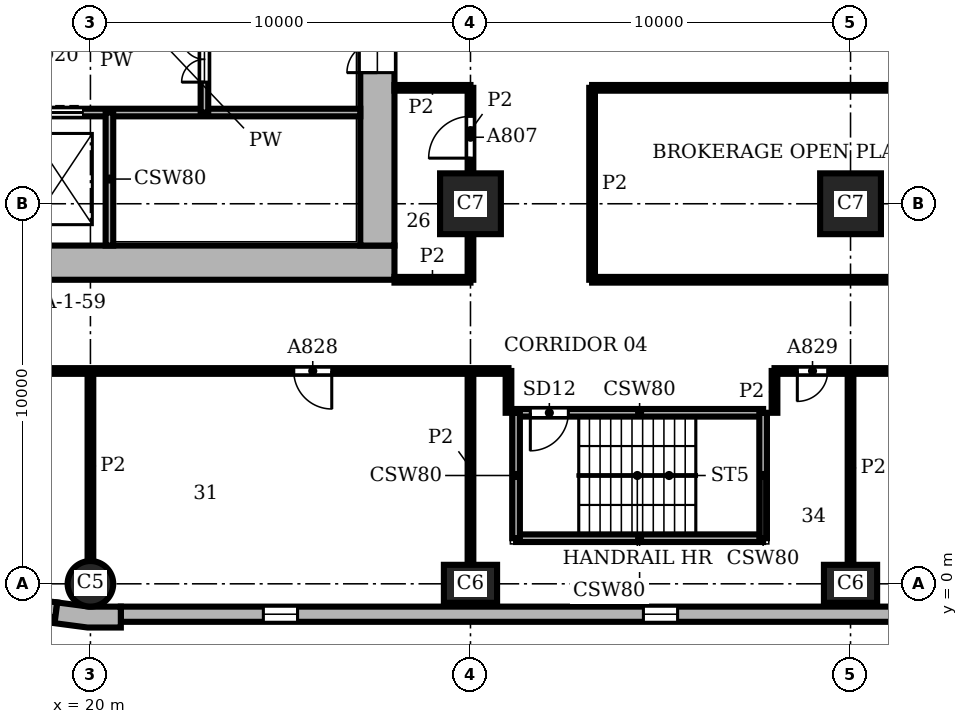
"""IFC4 building model, lengths in metres.
Left out: names, types, materials, properties, quantities, classifications, styles, units other than length and angle.
Written with IfcOpenShell. Run it as: python <this file> out.ifc"""

import sys

from ifc_helpers import new_model, si_unit, direction, frame, frame_2d, origin, origin_2d, place, context, subcontext, project, spatial, polyline, rectangle, circle, outline, extrude, element, fill, save


model = new_model("IFC4")
c1 = context("Model", 3, precision=1e-05, world=origin(), true_north=direction((0.0, 1.0)))
c2 = subcontext(c1, "Body", "Model", "MODEL_VIEW")
j1 = project(units=[si_unit("LENGTHUNIT", "METRE"), si_unit("PLANEANGLEUNIT", "RADIAN")], contexts=[c1])
p1 = place(None, origin())
s1 = spatial("IfcSite", under=j1, at=p1, CompositionType="ELEMENT")
p2 = place(p1, origin())
s2 = spatial("IfcBuilding", under=s1, at=p2, CompositionType="ELEMENT")
p3 = place(p2, frame((0.0, 0.0, 93.9)))
s3 = spatial("IfcBuildingStorey", under=s2, at=p3, CompositionType="ELEMENT", Elevation=93.9)
p4 = place(p3, frame((20.0, 0.0, 0.0), z_axis=(0.0, 0.0, 1.0), x_axis=(1.0, 0.0, 0.0)))
e1 = element("IfcColumn", 1, at=p4, inside=s3, PredefinedType="COLUMN", context=c2, shape_type="SweptSolid", body=[
    extrude(circle(Radius=0.6, at=origin_2d()), origin(), (0.0, 0.0, 1.0), 3.9),
])
for number, where, z_axis, x_axis in (
    (2, (30.0, 0.0, 0.0), (0.0, 0.0, 1.0), (1.0, 0.0, 0.0)),
    (3, (40.0, 0.0, 0.0), (0.0, 0.0, 1.0), (1.0, 0.0, 0.0)),
):
    element("IfcColumn", number, at=place(p3, frame(where, z_axis=z_axis, x_axis=x_axis)), inside=s3, PredefinedType="COLUMN", context=c2, shape_type="SweptSolid", body=[
        extrude(rectangle(XDim=1.4, YDim=1.0, at=origin_2d()), origin(), (0.0, 0.0, 1.0), 3.9),
    ])
for number, where, z_axis, x_axis in (
    (4, (30.0, 10.0, 0.0), (0.0, 0.0, 1.0), (1.0, 0.0, 0.0)),
    (5, (40.0, 10.0, 0.0), (0.0, 0.0, 1.0), (1.0, 0.0, 0.0)),
):
    element("IfcColumn", number, at=place(p3, frame(where, z_axis=z_axis, x_axis=x_axis)), inside=s3, PredefinedType="COLUMN", context=c2, shape_type="SweptSolid", body=[
        extrude(rectangle(XDim=1.6, YDim=1.6, at=origin_2d()), origin(), (0.0, 0.0, 1.0), 3.9),
    ])
p5 = place(p3, frame((8.0, 8.45, 0.0), z_axis=(0.0, 0.0, 1.0), x_axis=(1.0, 0.0, 0.0)))
e6 = element("IfcWall", 6, at=p5, inside=s3, PredefinedType="SHEAR", context=c2, shape_type="SweptSolid", body=[
    extrude(rectangle(XDim=20.0, YDim=0.9, at=frame_2d((10.0, 0.0))), origin(), (0.0, 0.0, 1.0), 3.9),
])
p6 = place(p3, frame((27.55, 8.9, 0.0), z_axis=(0.0, 0.0, 1.0), x_axis=(0.0, 1.0, 0.0)))
e7 = element("IfcWall", 7, at=p6, inside=s3, PredefinedType="SHEAR", context=c2, shape_type="SweptSolid", body=[
    extrude(rectangle(XDim=18.2, YDim=0.9, at=frame_2d((9.1, 0.0))), origin(), (0.0, 0.0, 1.0), 3.9),
])
p7 = place(p6, frame((4.55, 0.0, 0.0)))
e8 = element("IfcOpeningElement", 8, at=p7, cuts=e7, PredefinedType="OPENING", context=c2, shape_type="SweptSolid", body=[
    extrude(rectangle(XDim=1.6, YDim=2.1, at=frame_2d((0.8, 1.05))), frame((0.0, 0.46, 0.0), z_axis=(0.0, -1.0, 0.0), x_axis=(1.0, 0.0, 0.0)), (0.0, 0.0, 1.0), 0.92),
])
p8 = place(p3, origin())
e9 = element("IfcWall", 9, at=p8, inside=s3, PredefinedType="SOLIDWALL", context=c2, shape_type="SweptSolid", body=[
    extrude(outline(polyline([(19.076, -0.887), (19.057, -1.036), (19.925, -1.15), (20.8, -1.15), (20.8, -1.0), (20.8, -0.6), (19.961, -0.6), (19.128, -0.49), (19.076, -0.887)])), origin(), (0.0, 0.0, 1.0), 3.9),
])
p9 = place(p3, frame((20.8, -0.8, 0.0), z_axis=(0.0, 0.0, 1.0), x_axis=(1.0, 0.0, 0.0)))
e10 = element("IfcWall", 10, at=p9, inside=s3, PredefinedType="SOLIDWALL", context=c2, shape_type="SweptSolid", body=[
    extrude(rectangle(XDim=48.4, YDim=0.4, at=frame_2d((24.2, 0.0))), origin(), (0.0, 0.0, 1.0), 3.9),
])
p10 = place(p9, frame((3.75, 0.0, 0.9)))
e11 = element("IfcOpeningElement", 11, at=p10, cuts=e10, PredefinedType="OPENING", context=c2, shape_type="SweptSolid", body=[
    extrude(rectangle(XDim=0.9, YDim=2.35, at=frame_2d((0.45, 1.175))), frame((0.0, 0.21, 0.0), z_axis=(0.0, -1.0, 0.0), x_axis=(1.0, 0.0, 0.0)), (0.0, 0.0, 1.0), 0.42),
])
p11 = place(p9, frame((13.75, 0.0, 0.9)))
e12 = element("IfcOpeningElement", 12, at=p11, cuts=e10, PredefinedType="OPENING", context=c2, shape_type="SweptSolid", body=[
    extrude(rectangle(XDim=0.9, YDim=2.35, at=frame_2d((0.45, 1.175))), frame((0.0, 0.21, 0.0), z_axis=(0.0, -1.0, 0.0), x_axis=(1.0, 0.0, 0.0)), (0.0, 0.0, 1.0), 0.42),
])
p12 = place(p9, frame((23.75, 0.0, 0.9)))
e13 = element("IfcOpeningElement", 13, at=p12, cuts=e10, PredefinedType="OPENING", context=c2, shape_type="SweptSolid", body=[
    extrude(rectangle(XDim=0.9, YDim=2.35, at=frame_2d((0.45, 1.175))), frame((0.0, 0.21, 0.0), z_axis=(0.0, -1.0, 0.0), x_axis=(1.0, 0.0, 0.0)), (0.0, 0.0, 1.0), 0.42),
])
p13 = place(p9, frame((33.75, 0.0, 0.9)))
e14 = element("IfcOpeningElement", 14, at=p13, cuts=e10, PredefinedType="OPENING", context=c2, shape_type="SweptSolid", body=[
    extrude(rectangle(XDim=0.9, YDim=2.35, at=frame_2d((0.45, 1.175))), frame((0.0, 0.21, 0.0), z_axis=(0.0, -1.0, 0.0), x_axis=(1.0, 0.0, 0.0)), (0.0, 0.0, 1.0), 0.42),
])
p14 = place(p9, frame((43.75, 0.0, 0.9)))
e15 = element("IfcOpeningElement", 15, at=p14, cuts=e10, PredefinedType="OPENING", context=c2, shape_type="SweptSolid", body=[
    extrude(rectangle(XDim=0.9, YDim=2.35, at=frame_2d((0.45, 1.175))), frame((0.0, 0.21, 0.0), z_axis=(0.0, -1.0, 0.0), x_axis=(1.0, 0.0, 0.0)), (0.0, 0.0, 1.0), 0.42),
])
p15 = place(p3, frame((15.017, -0.151, 0.0), z_axis=(0.0, 0.0, 1.0), x_axis=(0.991446429508, -0.130514280502, 0.0)))
e16 = element("IfcWall", 16, at=p15, inside=s3, PredefinedType="SOLIDWALL", context=c2, shape_type="SweptSolid", body=[
    extrude(rectangle(XDim=4.121, YDim=0.4, at=frame_2d((2.061, 0.0))), origin(), (0.0, 0.0, 1.0), 3.9),
])
p16 = place(p15, frame((1.611, 0.0, 0.9)))
e17 = element("IfcOpeningElement", 17, at=p16, cuts=e16, PredefinedType="OPENING", context=c2, shape_type="SweptSolid", body=[
    extrude(rectangle(XDim=0.9, YDim=2.35, at=frame_2d((0.45, 1.175))), frame((0.0, 0.21, 0.0), z_axis=(0.0, -1.0, 0.0), x_axis=(1.0, 0.0, 0.0)), (0.0, 0.0, 1.0), 0.42),
])
p17 = place(p3, frame((31.2, 1.2, 0.0), z_axis=(0.0, 0.0, 1.0), x_axis=(1.0, 0.0, 0.0)))
e18 = element("IfcWall", 18, at=p17, inside=s3, PredefinedType="SHEAR", context=c2, shape_type="SweptSolid", body=[
    extrude(rectangle(XDim=6.5, YDim=0.2, at=frame_2d((3.25, 0.0))), origin(), (0.0, 0.0, 1.0), 3.58),
])
p18 = place(p3, frame((31.2, 4.5, 0.0), z_axis=(0.0, 0.0, 1.0), x_axis=(1.0, 0.0, 0.0)))
e19 = element("IfcWall", 19, at=p18, inside=s3, PredefinedType="SHEAR", context=c2, shape_type="SweptSolid", body=[
    extrude(rectangle(XDim=6.5, YDim=0.2, at=frame_2d((3.25, 0.0))), origin(), (0.0, 0.0, 1.0), 3.58),
])
p19 = place(p18, frame((0.375, 0.0, 0.0)))
e20 = element("IfcOpeningElement", 20, at=p19, cuts=e19, PredefinedType="OPENING", context=c2, shape_type="SweptSolid", body=[
    extrude(rectangle(XDim=1.0, YDim=2.1, at=frame_2d((0.5, 1.05))), frame((0.0, 0.11, 0.0), z_axis=(0.0, -1.0, 0.0), x_axis=(1.0, 0.0, 0.0)), (0.0, 0.0, 1.0), 0.22),
])
p20 = place(p3, frame((13.8, 12.4, 0.0), z_axis=(0.0, 0.0, 1.0), x_axis=(1.0, 0.0, 0.0)))
e21 = element("IfcWall", 21, at=p20, inside=s3, PredefinedType="SHEAR", context=c2, shape_type="SweptSolid", body=[
    extrude(rectangle(XDim=13.3, YDim=0.2, at=frame_2d((6.65, 0.0))), origin(), (0.0, 0.0, 1.0), 3.58),
])
p21 = place(p20, frame((2.4, 0.0, 0.0)))
e22 = element("IfcOpeningElement", 22, at=p21, cuts=e21, PredefinedType="OPENING", context=c2, shape_type="SweptSolid", body=[
    extrude(rectangle(XDim=1.1, YDim=2.1, at=frame_2d((0.55, 1.05))), frame((0.0, 0.11, 0.0), z_axis=(0.0, -1.0, 0.0), x_axis=(1.0, 0.0, 0.0)), (0.0, 0.0, 1.0), 0.22),
])
p22 = place(p20, frame((4.9, 0.0, 0.0)))
e23 = element("IfcOpeningElement", 23, at=p22, cuts=e21, PredefinedType="OPENING", context=c2, shape_type="SweptSolid", body=[
    extrude(rectangle(XDim=1.1, YDim=2.1, at=frame_2d((0.55, 1.05))), frame((0.0, 0.11, 0.0), z_axis=(0.0, -1.0, 0.0), x_axis=(1.0, 0.0, 0.0)), (0.0, 0.0, 1.0), 0.22),
])
p23 = place(p20, frame((0.25, 0.0, 0.0)))
e24 = element("IfcOpeningElement", 24, at=p23, cuts=e21, PredefinedType="OPENING", context=c2, shape_type="SweptSolid", body=[
    extrude(rectangle(XDim=1.0, YDim=2.1, at=frame_2d((0.5, 1.05))), frame((0.0, 0.11, 0.0), z_axis=(0.0, -1.0, 0.0), x_axis=(1.0, 0.0, 0.0)), (0.0, 0.0, 1.0), 0.22),
])
p24 = place(p3, frame((20.5, 8.9, 0.0), z_axis=(0.0, 0.0, 1.0), x_axis=(0.0, 1.0, 0.0)))
e25 = element("IfcWall", 25, at=p24, inside=s3, PredefinedType="SHEAR", context=c2, shape_type="SweptSolid", body=[
    extrude(rectangle(XDim=3.5, YDim=0.2, at=frame_2d((1.75, 0.0))), origin(), (0.0, 0.0, 1.0), 3.58),
])
p25 = place(p3, frame((23.0, 12.4, 0.0), z_axis=(0.0, 0.0, 1.0), x_axis=(0.0, 1.0, 0.0)))
e26 = element("IfcWall", 26, at=p25, inside=s3, PredefinedType="SHEAR", context=c2, shape_type="SweptSolid", body=[
    extrude(rectangle(XDim=2.8, YDim=0.2, at=frame_2d((1.4, 0.0))), origin(), (0.0, 0.0, 1.0), 3.58),
])
p26 = place(p25, frame((0.8, 0.0, 0.0)))
e27 = element("IfcOpeningElement", 27, at=p26, cuts=e26, PredefinedType="OPENING", context=c2, shape_type="SweptSolid", body=[
    extrude(rectangle(XDim=1.2, YDim=2.1, at=frame_2d((0.6, 1.05))), frame((0.0, 0.11, 0.0), z_axis=(0.0, -1.0, 0.0), x_axis=(1.0, 0.0, 0.0)), (0.0, 0.0, 1.0), 0.22),
])
for number, where, z_axis, x_axis in (
    (28, (31.2, 1.2, 0.0), (0.0, 0.0, 1.0), (0.0, 1.0, 0.0)),
    (29, (37.7, 1.2, 0.0), (0.0, 0.0, 1.0), (0.0, 1.0, 0.0)),
):
    element("IfcWall", number, at=place(p3, frame(where, z_axis=z_axis, x_axis=x_axis)), inside=s3, PredefinedType="SHEAR", context=c2, shape_type="SweptSolid", body=[
        extrude(rectangle(XDim=3.3, YDim=0.2, at=frame_2d((1.65, 0.0))), origin(), (0.0, 0.0, 1.0), 3.58),
    ])
p27 = place(p3, frame((20.0, 0.6, 0.0), z_axis=(0.0, 0.0, 1.0), x_axis=(0.0, 1.0, 0.0)))
e30 = element("IfcWall", 30, at=p27, inside=s3, PredefinedType="PARTITIONING", context=c2, shape_type="SweptSolid", body=[
    extrude(rectangle(XDim=5.0, YDim=0.15, at=frame_2d((2.5, 0.0))), origin(), (0.0, 0.0, 1.0), 3.58),
])
p28 = place(p3, frame((30.0, 0.5, 0.0), z_axis=(0.0, 0.0, 1.0), x_axis=(0.0, 1.0, 0.0)))
e31 = element("IfcWall", 31, at=p28, inside=s3, PredefinedType="PARTITIONING", context=c2, shape_type="SweptSolid", body=[
    extrude(rectangle(XDim=5.1, YDim=0.15, at=frame_2d((2.55, 0.0))), origin(), (0.0, 0.0, 1.0), 3.58),
])
p29 = place(p3, frame((30.0, 8.0, 0.0), z_axis=(0.0, 0.0, 1.0), x_axis=(0.0, 1.0, 0.0)))
e32 = element("IfcWall", 32, at=p29, inside=s3, PredefinedType="PARTITIONING", context=c2, shape_type="SweptSolid", body=[
    extrude(rectangle(XDim=1.2, YDim=0.15, at=frame_2d((0.6, 0.0))), origin(), (0.0, 0.0, 1.0), 3.58),
])
p30 = place(p3, frame((30.0, 10.8, 0.0), z_axis=(0.0, 0.0, 1.0), x_axis=(0.0, 1.0, 0.0)))
e33 = element("IfcWall", 33, at=p30, inside=s3, PredefinedType="PARTITIONING", context=c2, shape_type="SweptSolid", body=[
    extrude(rectangle(XDim=2.25, YDim=0.15, at=frame_2d((1.125, 0.0))), origin(), (0.0, 0.0, 1.0), 3.58),
])
p31 = place(p30, frame((0.4, 0.0, 0.0)))
e34 = element("IfcOpeningElement", 34, at=p31, cuts=e33, PredefinedType="OPENING", context=c2, shape_type="SweptSolid", body=[
    extrude(rectangle(XDim=1.1, YDim=2.1, at=frame_2d((0.55, 1.05))), frame((0.0, 0.085, 0.0), z_axis=(0.0, -1.0, 0.0), x_axis=(1.0, 0.0, 0.0)), (0.0, 0.0, 1.0), 0.17),
])
p32 = place(p3, frame((31.0, 4.5, 0.0), z_axis=(0.0, 0.0, 1.0), x_axis=(0.0, 1.0, 0.0)))
e35 = element("IfcWall", 35, at=p32, inside=s3, PredefinedType="PARTITIONING", context=c2, shape_type="SweptSolid", body=[
    extrude(rectangle(XDim=1.1, YDim=0.15, at=frame_2d((0.55, 0.0))), origin(), (0.0, 0.0, 1.0), 3.58),
])
p33 = place(p3, frame((33.2, 8.0, 0.0), z_axis=(0.0, 0.0, 1.0), x_axis=(0.0, 1.0, 0.0)))
e36 = element("IfcWall", 36, at=p33, inside=s3, PredefinedType="PARTITIONING", context=c2, shape_type="SweptSolid", body=[
    extrude(rectangle(XDim=5.05, YDim=0.15, at=frame_2d((2.525, 0.0))), origin(), (0.0, 0.0, 1.0), 3.58),
])
p34 = place(p3, frame((38.0, 4.5, 0.0), z_axis=(0.0, 0.0, 1.0), x_axis=(0.0, 1.0, 0.0)))
e37 = element("IfcWall", 37, at=p34, inside=s3, PredefinedType="PARTITIONING", context=c2, shape_type="SweptSolid", body=[
    extrude(rectangle(XDim=1.1, YDim=0.15, at=frame_2d((0.55, 0.0))), origin(), (0.0, 0.0, 1.0), 3.58),
])
p35 = place(p3, frame((40.0, 0.5, 0.0), z_axis=(0.0, 0.0, 1.0), x_axis=(0.0, 1.0, 0.0)))
e38 = element("IfcWall", 38, at=p35, inside=s3, PredefinedType="PARTITIONING", context=c2, shape_type="SweptSolid", body=[
    extrude(rectangle(XDim=5.1, YDim=0.15, at=frame_2d((2.55, 0.0))), origin(), (0.0, 0.0, 1.0), 3.58),
])
p36 = place(p3, frame((5.6, 5.6, 0.0), z_axis=(0.0, 0.0, 1.0), x_axis=(1.0, 0.0, 0.0)))
e39 = element("IfcWall", 39, at=p36, inside=s3, PredefinedType="PARTITIONING", context=c2, shape_type="SweptSolid", body=[
    extrude(rectangle(XDim=25.4, YDim=0.15, at=frame_2d((12.7, 0.0))), origin(), (0.0, 0.0, 1.0), 3.58),
])
p37 = place(p36, frame((4.35, 0.0, 0.0)))
e40 = element("IfcOpeningElement", 40, at=p37, cuts=e39, PredefinedType="OPENING", context=c2, shape_type="SweptSolid", body=[
    extrude(rectangle(XDim=1.0, YDim=2.1, at=frame_2d((0.5, 1.05))), frame((0.0, 0.085, 0.0), z_axis=(0.0, -1.0, 0.0), x_axis=(1.0, 0.0, 0.0)), (0.0, 0.0, 1.0), 0.17),
])
p38 = place(p36, frame((11.25, 0.0, 0.0)))
e41 = element("IfcOpeningElement", 41, at=p38, cuts=e39, PredefinedType="OPENING", context=c2, shape_type="SweptSolid", body=[
    extrude(rectangle(XDim=1.1, YDim=2.1, at=frame_2d((0.55, 1.05))), frame((0.0, 0.085, 0.0), z_axis=(0.0, -1.0, 0.0), x_axis=(1.0, 0.0, 0.0)), (0.0, 0.0, 1.0), 0.17),
])
p39 = place(p36, frame((19.75, 0.0, 0.0)))
e42 = element("IfcOpeningElement", 42, at=p39, cuts=e39, PredefinedType="OPENING", context=c2, shape_type="SweptSolid", body=[
    extrude(rectangle(XDim=1.0, YDim=2.1, at=frame_2d((0.5, 1.05))), frame((0.0, 0.085, 0.0), z_axis=(0.0, -1.0, 0.0), x_axis=(1.0, 0.0, 0.0)), (0.0, 0.0, 1.0), 0.17),
])
p40 = place(p3, frame((38.0, 5.6, 0.0), z_axis=(0.0, 0.0, 1.0), x_axis=(1.0, 0.0, 0.0)))
e43 = element("IfcWall", 43, at=p40, inside=s3, PredefinedType="PARTITIONING", context=c2, shape_type="SweptSolid", body=[
    extrude(rectangle(XDim=27.0, YDim=0.15, at=frame_2d((13.5, 0.0))), origin(), (0.0, 0.0, 1.0), 3.58),
])
p41 = place(p40, frame((7.6, 0.0, 0.0)))
e44 = element("IfcOpeningElement", 44, at=p41, cuts=e43, PredefinedType="OPENING", context=c2, shape_type="SweptSolid", body=[
    extrude(rectangle(XDim=1.0, YDim=2.1, at=frame_2d((0.5, 1.05))), frame((0.0, 0.085, 0.0), z_axis=(0.0, -1.0, 0.0), x_axis=(1.0, 0.0, 0.0)), (0.0, 0.0, 1.0), 0.17),
])
p42 = place(p40, frame((17.6, 0.0, 0.0)))
e45 = element("IfcOpeningElement", 45, at=p42, cuts=e43, PredefinedType="OPENING", context=c2, shape_type="SweptSolid", body=[
    extrude(rectangle(XDim=1.0, YDim=2.1, at=frame_2d((0.5, 1.05))), frame((0.0, 0.085, 0.0), z_axis=(0.0, -1.0, 0.0), x_axis=(1.0, 0.0, 0.0)), (0.0, 0.0, 1.0), 0.17),
])
p43 = place(p40, frame((0.6, 0.0, 0.0)))
e46 = element("IfcOpeningElement", 46, at=p43, cuts=e43, PredefinedType="OPENING", context=c2, shape_type="SweptSolid", body=[
    extrude(rectangle(XDim=0.8, YDim=2.1, at=frame_2d((0.4, 1.05))), frame((0.0, 0.085, 0.0), z_axis=(0.0, -1.0, 0.0), x_axis=(1.0, 0.0, 0.0)), (0.0, 0.0, 1.0), 0.17),
])
p44 = place(p3, frame((28.0, 8.0, 0.0), z_axis=(0.0, 0.0, 1.0), x_axis=(1.0, 0.0, 0.0)))
e47 = element("IfcWall", 47, at=p44, inside=s3, PredefinedType="PARTITIONING", context=c2, shape_type="SweptSolid", body=[
    extrude(rectangle(XDim=2.0, YDim=0.15, at=frame_2d((1.0, 0.0))), origin(), (0.0, 0.0, 1.0), 3.58),
])
p45 = place(p3, frame((33.2, 8.0, 0.0), z_axis=(0.0, 0.0, 1.0), x_axis=(1.0, 0.0, 0.0)))
e48 = element("IfcWall", 48, at=p45, inside=s3, PredefinedType="PARTITIONING", context=c2, shape_type="SweptSolid", body=[
    extrude(rectangle(XDim=29.1, YDim=0.15, at=frame_2d((14.55, 0.0))), origin(), (0.0, 0.0, 1.0), 3.58),
])
p46 = place(p3, frame((28.0, 13.05, 0.0), z_axis=(0.0, 0.0, 1.0), x_axis=(1.0, 0.0, 0.0)))
e49 = element("IfcWall", 49, at=p46, inside=s3, PredefinedType="PARTITIONING", context=c2, shape_type="SweptSolid", body=[
    extrude(rectangle(XDim=2.0, YDim=0.15, at=frame_2d((1.0, 0.0))), origin(), (0.0, 0.0, 1.0), 3.58),
])
p47 = place(p3, frame((33.2, 13.05, 0.0), z_axis=(0.0, 0.0, 1.0), x_axis=(1.0, 0.0, 0.0)))
e50 = element("IfcWall", 50, at=p47, inside=s3, PredefinedType="PARTITIONING", context=c2, shape_type="SweptSolid", body=[
    extrude(rectangle(XDim=29.1, YDim=0.15, at=frame_2d((14.55, 0.0))), origin(), (0.0, 0.0, 1.0), 3.58),
])
p48 = place(p47, frame((10.35, 0.0, 0.0)))
e51 = element("IfcOpeningElement", 51, at=p48, cuts=e50, PredefinedType="OPENING", context=c2, shape_type="SweptSolid", body=[
    extrude(rectangle(XDim=1.0, YDim=2.1, at=frame_2d((0.5, 1.05))), frame((0.0, 0.085, 0.0), z_axis=(0.0, -1.0, 0.0), x_axis=(1.0, 0.0, 0.0)), (0.0, 0.0, 1.0), 0.17),
])
p49 = place(p10, origin())
e52 = element("IfcWindow", 52, at=p49, inside=s3, PartitioningType="SINGLE_PANEL", PredefinedType="WINDOW", context=c2, shape_type="SweptSolid", body=[
    extrude(rectangle(XDim=0.9, YDim=2.35, at=frame_2d((0.45, 1.175))), frame((0.0, 0.16, 0.0), z_axis=(0.0, -1.0, 0.0), x_axis=(1.0, 0.0, 0.0)), (0.0, 0.0, 1.0), 0.06),
])
fill(e11, e52)
p50 = place(p11, origin())
e53 = element("IfcWindow", 53, at=p50, inside=s3, PartitioningType="SINGLE_PANEL", PredefinedType="WINDOW", context=c2, shape_type="SweptSolid", body=[
    extrude(rectangle(XDim=0.9, YDim=2.35, at=frame_2d((0.45, 1.175))), frame((0.0, 0.16, 0.0), z_axis=(0.0, -1.0, 0.0), x_axis=(1.0, 0.0, 0.0)), (0.0, 0.0, 1.0), 0.06),
])
fill(e12, e53)
p51 = place(p22, origin())
e54 = element("IfcDoor", 54, at=p51, inside=s3, OperationType="DOUBLE_DOOR_SLIDING", PredefinedType="DOOR", context=c2, shape_type="SweptSolid", body=[
    extrude(rectangle(XDim=1.1, YDim=2.1, at=frame_2d((0.55, 1.05))), frame((0.0, 0.025, 0.0), z_axis=(0.0, -1.0, 0.0), x_axis=(1.0, 0.0, 0.0)), (0.0, 0.0, 1.0), 0.05),
])
fill(e23, e54)
p52 = place(p19, frame((1.0, 0.0, 0.0), z_axis=(0.0, 0.0, 1.0), x_axis=(-1.0, 0.0, 0.0)))
e55 = element("IfcDoor", 55, at=p52, inside=s3, OperationType="SINGLE_SWING_RIGHT", PredefinedType="DOOR", context=c2, shape_type="SweptSolid", body=[
    extrude(rectangle(XDim=1.0, YDim=2.1, at=frame_2d((0.5, 1.05))), frame((0.0, 0.025, 0.0), z_axis=(0.0, -1.0, 0.0), x_axis=(1.0, 0.0, 0.0)), (0.0, 0.0, 1.0), 0.05),
])
fill(e20, e55)
p53 = place(p26, origin())
e56 = element("IfcDoor", 56, at=p53, inside=s3, OperationType="DOUBLE_DOOR_SINGLE_SWING", PredefinedType="DOOR", context=c2, shape_type="SweptSolid", body=[
    extrude(rectangle(XDim=1.2, YDim=2.1, at=frame_2d((0.6, 1.05))), frame((0.0, 0.025, 0.0), z_axis=(0.0, -1.0, 0.0), x_axis=(1.0, 0.0, 0.0)), (0.0, 0.0, 1.0), 0.05),
])
fill(e27, e56)
p54 = place(p7, origin())
e57 = element("IfcDoor", 57, at=p54, inside=s3, OperationType="DOUBLE_DOOR_SINGLE_SWING", PredefinedType="DOOR", context=c2, shape_type="SweptSolid", body=[
    extrude(rectangle(XDim=1.6, YDim=2.1, at=frame_2d((0.8, 1.05))), frame((0.0, 0.025, 0.0), z_axis=(0.0, -1.0, 0.0), x_axis=(1.0, 0.0, 0.0)), (0.0, 0.0, 1.0), 0.05),
])
fill(e8, e57)
p55 = place(p31, origin())
e58 = element("IfcDoor", 58, at=p55, inside=s3, OperationType="SINGLE_SWING_LEFT", PredefinedType="DOOR", context=c2, shape_type="SweptSolid", body=[
    extrude(rectangle(XDim=1.1, YDim=2.1, at=frame_2d((0.55, 1.05))), frame((0.0, 0.025, 0.0), z_axis=(0.0, -1.0, 0.0), x_axis=(1.0, 0.0, 0.0)), (0.0, 0.0, 1.0), 0.05),
])
fill(e34, e58)
p56 = place(p39, frame((1.0, 0.0, 0.0), z_axis=(0.0, 0.0, 1.0), x_axis=(-1.0, 0.0, 0.0)))
e59 = element("IfcDoor", 59, at=p56, inside=s3, OperationType="SINGLE_SWING_LEFT", PredefinedType="DOOR", context=c2, shape_type="SweptSolid", body=[
    extrude(rectangle(XDim=1.0, YDim=2.1, at=frame_2d((0.5, 1.05))), frame((0.0, 0.025, 0.0), z_axis=(0.0, -1.0, 0.0), x_axis=(1.0, 0.0, 0.0)), (0.0, 0.0, 1.0), 0.05),
])
fill(e42, e59)
p57 = place(p43, frame((0.8, 0.0, 0.0), z_axis=(0.0, 0.0, 1.0), x_axis=(-1.0, 0.0, 0.0)))
e60 = element("IfcDoor", 60, at=p57, inside=s3, OperationType="SINGLE_SWING_RIGHT", PredefinedType="DOOR", context=c2, shape_type="SweptSolid", body=[
    extrude(rectangle(XDim=0.8, YDim=2.1, at=frame_2d((0.4, 1.05))), frame((0.0, 0.025, 0.0), z_axis=(0.0, -1.0, 0.0), x_axis=(1.0, 0.0, 0.0)), (0.0, 0.0, 1.0), 0.05),
])
fill(e46, e60)
save(model, sys.argv[1])
